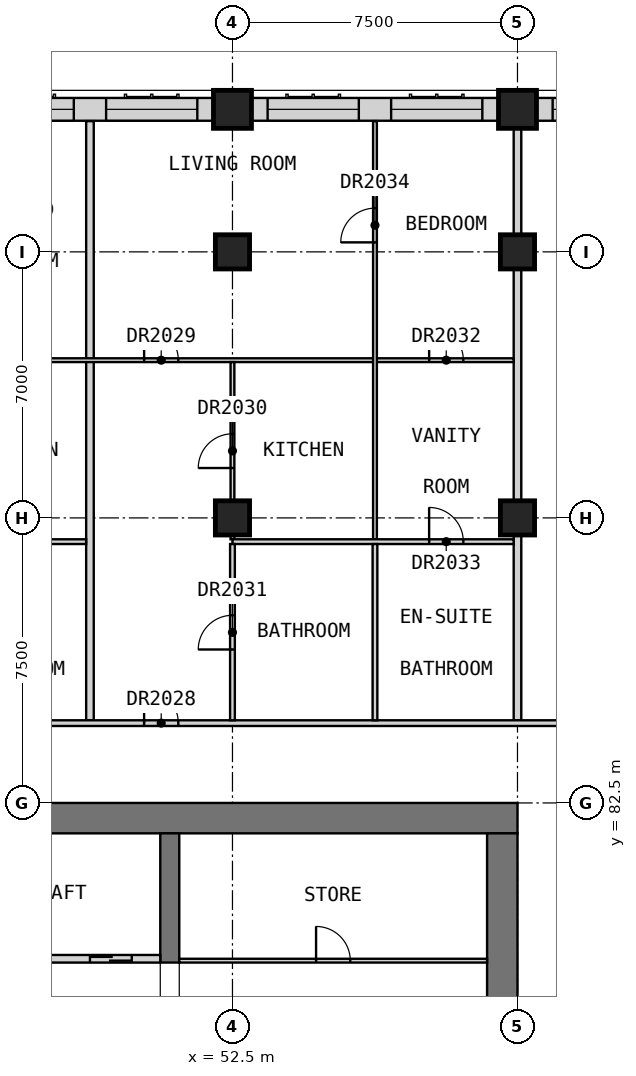
"""IFC4 building model, lengths in metres.
Left out: names, types, materials, properties, quantities, classifications, styles, units other than length and angle.
Written with IfcOpenShell. Run it as: python <this file> out.ifc"""

import sys

from ifc_helpers import new_model, si_unit, direction, frame, frame_2d, origin, origin_2d, place, context, subcontext, project, spatial, rectangle, extrude, element, fill, save


model = new_model("IFC4")
c1 = context("Model", 3, precision=1e-05, world=origin(), true_north=direction((0.0, 1.0)))
c2 = subcontext(c1, "Body", "Model", "MODEL_VIEW")
j1 = project(units=[si_unit("LENGTHUNIT", "METRE"), si_unit("PLANEANGLEUNIT", "RADIAN")], contexts=[c1])
p1 = place(None, origin())
s1 = spatial("IfcSite", under=j1, at=p1, CompositionType="ELEMENT")
p2 = place(p1, origin())
s2 = spatial("IfcBuilding", under=s1, at=p2, CompositionType="ELEMENT")
p3 = place(p2, frame((0.0, 0.0, 210.7)))
s3 = spatial("IfcBuildingStorey", under=s2, at=p3, CompositionType="ELEMENT", Elevation=210.7)
for number, where, z_axis, x_axis in (
    (1, (52.5, 100.75, 0.0), (0.0, 0.0, 1.0), (1.0, 0.0, 0.0)),
    (2, (60.0, 100.75, 0.0), (0.0, 0.0, 1.0), (1.0, 0.0, 0.0)),
):
    element("IfcColumn", number, at=place(p3, frame(where, z_axis=z_axis, x_axis=x_axis)), inside=s3, PredefinedType="COLUMN", context=c2, shape_type="SweptSolid", body=[
        extrude(rectangle(XDim=1.0, YDim=1.0, at=origin_2d()), origin(), (0.0, 0.0, 1.0), 3.5),
    ])
for number, where, z_axis, x_axis in (
    (3, (52.5, 90.0, 0.0), (0.0, 0.0, 1.0), (1.0, 0.0, 0.0)),
    (4, (52.5, 97.0, 0.0), (0.0, 0.0, 1.0), (1.0, 0.0, 0.0)),
    (5, (60.0, 90.0, 0.0), (0.0, 0.0, 1.0), (1.0, 0.0, 0.0)),
    (6, (60.0, 97.0, 0.0), (0.0, 0.0, 1.0), (1.0, 0.0, 0.0)),
):
    element("IfcColumn", number, at=place(p3, frame(where, z_axis=z_axis, x_axis=x_axis)), inside=s3, PredefinedType="COLUMN", context=c2, shape_type="SweptSolid", body=[
        extrude(rectangle(XDim=0.9, YDim=0.9, at=origin_2d()), origin(), (0.0, 0.0, 1.0), 3.5),
    ])
p4 = place(p3, frame((30.0, 82.1, 0.0), z_axis=(0.0, 0.0, 1.0), x_axis=(1.0, 0.0, 0.0)))
e7 = element("IfcWall", 7, at=p4, inside=s3, PredefinedType="SHEAR", context=c2, shape_type="SweptSolid", body=[
    extrude(rectangle(XDim=30.0, YDim=0.8, at=frame_2d((15.0, 0.0))), origin(), (0.0, 0.0, 1.0), 3.5),
])
p5 = place(p3, frame((59.6, 60.8, 0.0), z_axis=(0.0, 0.0, 1.0), x_axis=(0.0, 1.0, 0.0)))
e8 = element("IfcWall", 8, at=p5, inside=s3, PredefinedType="SHEAR", context=c2, shape_type="SweptSolid", body=[
    extrude(rectangle(XDim=20.9, YDim=0.8, at=frame_2d((10.45, 0.0))), origin(), (0.0, 0.0, 1.0), 3.5),
])
p6 = place(p5, frame((14.7, 0.0, 0.0)))
e9 = element("IfcOpeningElement", 9, at=p6, cuts=e8, PredefinedType="OPENING", context=c2, shape_type="SweptSolid", body=[
    extrude(rectangle(XDim=1.8, YDim=2.1, at=frame_2d((0.9, 1.05))), frame((0.0, 0.41, 0.0), z_axis=(0.0, -1.0, 0.0), x_axis=(1.0, 0.0, 0.0)), (0.0, 0.0, 1.0), 0.82),
])
p7 = place(p3, frame((50.85, 78.3, 0.0), z_axis=(0.0, 0.0, 1.0), x_axis=(0.0, 1.0, 0.0)))
e10 = element("IfcWall", 10, at=p7, inside=s3, PredefinedType="SHEAR", context=c2, shape_type="SweptSolid", body=[
    extrude(rectangle(XDim=3.4, YDim=0.5, at=frame_2d((1.7, 0.0))), origin(), (0.0, 0.0, 1.0), 3.5),
])
p8 = place(p3, frame((67.0, 100.75, 0.0), z_axis=(0.0, 0.0, 1.0), x_axis=(-1.0, 0.0, 0.0)))
e11 = element("IfcWall", 11, at=p8, inside=s3, PredefinedType="SOLIDWALL", context=c2, shape_type="SweptSolid", body=[
    extrude(rectangle(XDim=6.5, YDim=0.6, at=frame_2d((3.25, 0.0))), origin(), (0.0, 0.0, 1.0), 2.75),
])
p9 = place(p8, frame((3.675, 0.0, 0.8)))
e12 = element("IfcOpeningElement", 12, at=p9, cuts=e11, PredefinedType="OPENING", context=c2, shape_type="SweptSolid", body=[
    extrude(rectangle(XDim=2.4, YDim=1.8, at=frame_2d((1.2, 0.9))), frame((0.0, 0.31, 0.0), z_axis=(0.0, -1.0, 0.0), x_axis=(1.0, 0.0, 0.0)), (0.0, 0.0, 1.0), 0.62),
])
p10 = place(p8, frame((0.425, 0.0, 0.8)))
e13 = element("IfcOpeningElement", 13, at=p10, cuts=e11, PredefinedType="OPENING", context=c2, shape_type="SweptSolid", body=[
    extrude(rectangle(XDim=2.4, YDim=1.8, at=frame_2d((1.2, 0.9))), frame((0.0, 0.31, 0.0), z_axis=(0.0, -1.0, 0.0), x_axis=(1.0, 0.0, 0.0)), (0.0, 0.0, 1.0), 0.62),
])
p11 = place(p3, frame((59.5, 100.75, 0.0), z_axis=(0.0, 0.0, 1.0), x_axis=(-1.0, 0.0, 0.0)))
e14 = element("IfcWall", 14, at=p11, inside=s3, PredefinedType="SOLIDWALL", context=c2, shape_type="SweptSolid", body=[
    extrude(rectangle(XDim=6.5, YDim=0.6, at=frame_2d((3.25, 0.0))), origin(), (0.0, 0.0, 1.0), 2.75),
])
p12 = place(p11, frame((3.675, 0.0, 0.8)))
e15 = element("IfcOpeningElement", 15, at=p12, cuts=e14, PredefinedType="OPENING", context=c2, shape_type="SweptSolid", body=[
    extrude(rectangle(XDim=2.4, YDim=1.8, at=frame_2d((1.2, 0.9))), frame((0.0, 0.31, 0.0), z_axis=(0.0, -1.0, 0.0), x_axis=(1.0, 0.0, 0.0)), (0.0, 0.0, 1.0), 0.62),
])
p13 = place(p11, frame((0.425, 0.0, 0.8)))
e16 = element("IfcOpeningElement", 16, at=p13, cuts=e14, PredefinedType="OPENING", context=c2, shape_type="SweptSolid", body=[
    extrude(rectangle(XDim=2.4, YDim=1.8, at=frame_2d((1.2, 0.9))), frame((0.0, 0.31, 0.0), z_axis=(0.0, -1.0, 0.0), x_axis=(1.0, 0.0, 0.0)), (0.0, 0.0, 1.0), 0.62),
])
p14 = place(p3, frame((52.0, 100.75, 0.0), z_axis=(0.0, 0.0, 1.0), x_axis=(-1.0, 0.0, 0.0)))
e17 = element("IfcWall", 17, at=p14, inside=s3, PredefinedType="SOLIDWALL", context=c2, shape_type="SweptSolid", body=[
    extrude(rectangle(XDim=6.5, YDim=0.6, at=frame_2d((3.25, 0.0))), origin(), (0.0, 0.0, 1.0), 2.75),
])
p15 = place(p14, frame((3.675, 0.0, 0.8)))
e18 = element("IfcOpeningElement", 18, at=p15, cuts=e17, PredefinedType="OPENING", context=c2, shape_type="SweptSolid", body=[
    extrude(rectangle(XDim=2.4, YDim=1.8, at=frame_2d((1.2, 0.9))), frame((0.0, 0.31, 0.0), z_axis=(0.0, -1.0, 0.0), x_axis=(1.0, 0.0, 0.0)), (0.0, 0.0, 1.0), 0.62),
])
p16 = place(p14, frame((0.425, 0.0, 0.8)))
e19 = element("IfcOpeningElement", 19, at=p16, cuts=e17, PredefinedType="OPENING", context=c2, shape_type="SweptSolid", body=[
    extrude(rectangle(XDim=2.4, YDim=1.8, at=frame_2d((1.2, 0.9))), frame((0.0, 0.31, 0.0), z_axis=(0.0, -1.0, 0.0), x_axis=(1.0, 0.0, 0.0)), (0.0, 0.0, 1.0), 0.62),
])
p17 = place(p3, frame((35.0, 78.4, 0.0), z_axis=(0.0, 0.0, 1.0), x_axis=(1.0, 0.0, 0.0)))
e20 = element("IfcWall", 20, at=p17, inside=s3, PredefinedType="SOLIDWALL", context=c2, shape_type="SweptSolid", body=[
    extrude(rectangle(XDim=15.6, YDim=0.2, at=frame_2d((7.8, 0.0))), origin(), (0.0, 0.0, 1.0), 3.5),
])
p18 = place(p17, frame((0.75, 0.0, 0.0)))
e21 = element("IfcOpeningElement", 21, at=p18, cuts=e20, PredefinedType="OPENING", context=c2, shape_type="SweptSolid", body=[
    extrude(rectangle(XDim=1.1, YDim=2.1, at=frame_2d((0.55, 1.05))), frame((0.0, 0.11, 0.0), z_axis=(0.0, -1.0, 0.0), x_axis=(1.0, 0.0, 0.0)), (0.0, 0.0, 1.0), 0.22),
])
p19 = place(p17, frame((3.35, 0.0, 0.0)))
e22 = element("IfcOpeningElement", 22, at=p19, cuts=e20, PredefinedType="OPENING", context=c2, shape_type="SweptSolid", body=[
    extrude(rectangle(XDim=1.1, YDim=2.1, at=frame_2d((0.55, 1.05))), frame((0.0, 0.11, 0.0), z_axis=(0.0, -1.0, 0.0), x_axis=(1.0, 0.0, 0.0)), (0.0, 0.0, 1.0), 0.22),
])
p20 = place(p17, frame((11.15, 0.0, 0.0)))
e23 = element("IfcOpeningElement", 23, at=p20, cuts=e20, PredefinedType="OPENING", context=c2, shape_type="SweptSolid", body=[
    extrude(rectangle(XDim=1.1, YDim=2.1, at=frame_2d((0.55, 1.05))), frame((0.0, 0.11, 0.0), z_axis=(0.0, -1.0, 0.0), x_axis=(1.0, 0.0, 0.0)), (0.0, 0.0, 1.0), 0.22),
])
p21 = place(p17, frame((13.75, 0.0, 0.0)))
e24 = element("IfcOpeningElement", 24, at=p21, cuts=e20, PredefinedType="OPENING", context=c2, shape_type="SweptSolid", body=[
    extrude(rectangle(XDim=1.1, YDim=2.1, at=frame_2d((0.55, 1.05))), frame((0.0, 0.11, 0.0), z_axis=(0.0, -1.0, 0.0), x_axis=(1.0, 0.0, 0.0)), (0.0, 0.0, 1.0), 0.22),
])
p22 = place(p3, frame((51.1, 78.35, 0.0), z_axis=(0.0, 0.0, 1.0), x_axis=(1.0, 0.0, 0.0)))
e25 = element("IfcWall", 25, at=p22, inside=s3, PredefinedType="PARTITIONING", context=c2, shape_type="SweptSolid", body=[
    extrude(rectangle(XDim=8.1, YDim=0.1, at=frame_2d((4.05, 0.0))), origin(), (0.0, 0.0, 1.0), 3.09),
])
p23 = place(p22, frame((3.6, 0.0, 0.0)))
e26 = element("IfcOpeningElement", 26, at=p23, cuts=e25, PredefinedType="OPENING", context=c2, shape_type="SweptSolid", body=[
    extrude(rectangle(XDim=0.9, YDim=2.1, at=frame_2d((0.45, 1.05))), frame((0.0, 0.06, 0.0), z_axis=(0.0, -1.0, 0.0), x_axis=(1.0, 0.0, 0.0)), (0.0, 0.0, 1.0), 0.12),
])
p24 = place(p3, frame((48.75, 84.675, 0.0), z_axis=(0.0, 0.0, 1.0), x_axis=(0.0, 1.0, 0.0)))
e27 = element("IfcWall", 27, at=p24, inside=s3, PredefinedType="PARTITIONING", context=c2, shape_type="SweptSolid", body=[
    extrude(rectangle(XDim=15.765, YDim=0.2, at=frame_2d((7.882, 0.0))), origin(), (0.0, 0.0, 1.0), 3.1),
])
p25 = place(p3, frame((60.0, 84.675, 0.0), z_axis=(0.0, 0.0, 1.0), x_axis=(0.0, 1.0, 0.0)))
e28 = element("IfcWall", 28, at=p25, inside=s3, PredefinedType="PARTITIONING", context=c2, shape_type="SweptSolid", body=[
    extrude(rectangle(XDim=16.575, YDim=0.2, at=frame_2d((8.288, 0.0))), origin(), (0.0, 0.0, 1.0), 3.1),
])
p26 = place(p3, frame((33.75, 84.6, 0.0), z_axis=(0.0, 0.0, 1.0), x_axis=(1.0, 0.0, 0.0)))
e29 = element("IfcWall", 29, at=p26, inside=s3, PredefinedType="PARTITIONING", context=c2, shape_type="SweptSolid", body=[
    extrude(rectangle(XDim=28.35, YDim=0.15, at=frame_2d((14.175, 0.0))), origin(), (0.0, 0.0, 1.0), 3.1),
])
p27 = place(p26, frame((1.375, 0.0, 0.0)))
e30 = element("IfcOpeningElement", 30, at=p27, cuts=e29, PredefinedType="OPENING", context=c2, shape_type="SweptSolid", body=[
    extrude(rectangle(XDim=1.0, YDim=2.1, at=frame_2d((0.5, 1.05))), frame((0.0, 0.085, 0.0), z_axis=(0.0, -1.0, 0.0), x_axis=(1.0, 0.0, 0.0)), (0.0, 0.0, 1.0), 0.17),
])
p28 = place(p26, frame((8.925, 0.0, 0.0)))
e31 = element("IfcOpeningElement", 31, at=p28, cuts=e29, PredefinedType="OPENING", context=c2, shape_type="SweptSolid", body=[
    extrude(rectangle(XDim=0.9, YDim=2.1, at=frame_2d((0.45, 1.05))), frame((0.0, 0.085, 0.0), z_axis=(0.0, -1.0, 0.0), x_axis=(1.0, 0.0, 0.0)), (0.0, 0.0, 1.0), 0.17),
])
p29 = place(p26, frame((16.425, 0.0, 0.0)))
e32 = element("IfcOpeningElement", 32, at=p29, cuts=e29, PredefinedType="OPENING", context=c2, shape_type="SweptSolid", body=[
    extrude(rectangle(XDim=0.9, YDim=2.1, at=frame_2d((0.45, 1.05))), frame((0.0, 0.085, 0.0), z_axis=(0.0, -1.0, 0.0), x_axis=(1.0, 0.0, 0.0)), (0.0, 0.0, 1.0), 0.17),
])
p30 = place(p3, frame((37.6, 94.15, 0.0), z_axis=(0.0, 0.0, 1.0), x_axis=(1.0, 0.0, 0.0)))
e33 = element("IfcWall", 33, at=p30, inside=s3, PredefinedType="PARTITIONING", context=c2, shape_type="SweptSolid", body=[
    extrude(rectangle(XDim=22.3, YDim=0.1, at=frame_2d((11.15, 0.0))), origin(), (0.0, 0.0, 1.0), 3.1),
])
p31 = place(p30, frame((1.325, 0.0, 0.0)))
e34 = element("IfcOpeningElement", 34, at=p31, cuts=e33, PredefinedType="OPENING", context=c2, shape_type="SweptSolid", body=[
    extrude(rectangle(XDim=0.9, YDim=2.1, at=frame_2d((0.45, 1.05))), frame((0.0, 0.06, 0.0), z_axis=(0.0, -1.0, 0.0), x_axis=(1.0, 0.0, 0.0)), (0.0, 0.0, 1.0), 0.12),
])
p32 = place(p30, frame((5.075, 0.0, 0.0)))
e35 = element("IfcOpeningElement", 35, at=p32, cuts=e33, PredefinedType="OPENING", context=c2, shape_type="SweptSolid", body=[
    extrude(rectangle(XDim=0.9, YDim=2.1, at=frame_2d((0.45, 1.05))), frame((0.0, 0.06, 0.0), z_axis=(0.0, -1.0, 0.0), x_axis=(1.0, 0.0, 0.0)), (0.0, 0.0, 1.0), 0.12),
])
p33 = place(p30, frame((12.575, 0.0, 0.0)))
e36 = element("IfcOpeningElement", 36, at=p33, cuts=e33, PredefinedType="OPENING", context=c2, shape_type="SweptSolid", body=[
    extrude(rectangle(XDim=0.9, YDim=2.1, at=frame_2d((0.45, 1.05))), frame((0.0, 0.06, 0.0), z_axis=(0.0, -1.0, 0.0), x_axis=(1.0, 0.0, 0.0)), (0.0, 0.0, 1.0), 0.12),
])
p34 = place(p30, frame((20.075, 0.0, 0.0)))
e37 = element("IfcOpeningElement", 37, at=p34, cuts=e33, PredefinedType="OPENING", context=c2, shape_type="SweptSolid", body=[
    extrude(rectangle(XDim=0.9, YDim=2.1, at=frame_2d((0.45, 1.05))), frame((0.0, 0.06, 0.0), z_axis=(0.0, -1.0, 0.0), x_axis=(1.0, 0.0, 0.0)), (0.0, 0.0, 1.0), 0.12),
])
p35 = place(p3, frame((52.5, 89.438, 0.0), z_axis=(0.0, 0.0, 1.0), x_axis=(0.0, 1.0, 0.0)))
e38 = element("IfcWall", 38, at=p35, inside=s3, PredefinedType="PARTITIONING", context=c2, shape_type="SweptSolid", body=[
    extrude(rectangle(XDim=4.663, YDim=0.1, at=frame_2d((2.331, 0.0))), origin(), (0.0, 0.0, 1.0), 3.1),
])
p36 = place(p35, frame((1.875, 0.0, 0.0)))
e39 = element("IfcOpeningElement", 39, at=p36, cuts=e38, PredefinedType="OPENING", context=c2, shape_type="SweptSolid", body=[
    extrude(rectangle(XDim=0.9, YDim=2.1, at=frame_2d((0.45, 1.05))), frame((0.0, 0.06, 0.0), z_axis=(0.0, -1.0, 0.0), x_axis=(1.0, 0.0, 0.0)), (0.0, 0.0, 1.0), 0.12),
])
p37 = place(p3, frame((56.25, 89.438, 0.0), z_axis=(0.0, 0.0, 1.0), x_axis=(0.0, 1.0, 0.0)))
e40 = element("IfcWall", 40, at=p37, inside=s3, PredefinedType="PARTITIONING", context=c2, shape_type="SweptSolid", body=[
    extrude(rectangle(XDim=11.002, YDim=0.1, at=frame_2d((5.501, 0.0))), origin(), (0.0, 0.0, 1.0), 3.1),
])
p38 = place(p37, frame((7.812, 0.0, 0.0)))
e41 = element("IfcOpeningElement", 41, at=p38, cuts=e40, PredefinedType="OPENING", context=c2, shape_type="SweptSolid", body=[
    extrude(rectangle(XDim=0.9, YDim=2.1, at=frame_2d((0.45, 1.05))), frame((0.0, 0.06, 0.0), z_axis=(0.0, -1.0, 0.0), x_axis=(1.0, 0.0, 0.0)), (0.0, 0.0, 1.0), 0.12),
])
p39 = place(p3, frame((45.0, 89.375, 0.0), z_axis=(0.0, 0.0, 1.0), x_axis=(1.0, 0.0, 0.0)))
e42 = element("IfcWall", 42, at=p39, inside=s3, PredefinedType="PARTITIONING", context=c2, shape_type="SweptSolid", body=[
    extrude(rectangle(XDim=3.65, YDim=0.125, at=frame_2d((1.825, 0.0))), origin(), (0.0, 0.0, 1.0), 3.1),
])
p40 = place(p3, frame((52.5, 89.375, 0.0), z_axis=(0.0, 0.0, 1.0), x_axis=(1.0, 0.0, 0.0)))
e43 = element("IfcWall", 43, at=p40, inside=s3, PredefinedType="PARTITIONING", context=c2, shape_type="SweptSolid", body=[
    extrude(rectangle(XDim=7.4, YDim=0.125, at=frame_2d((3.7, 0.0))), origin(), (0.0, 0.0, 1.0), 3.1),
])
p41 = place(p40, frame((5.175, 0.0, 0.0)))
e44 = element("IfcOpeningElement", 44, at=p41, cuts=e43, PredefinedType="OPENING", context=c2, shape_type="SweptSolid", body=[
    extrude(rectangle(XDim=0.9, YDim=2.1, at=frame_2d((0.45, 1.05))), frame((0.0, 0.073, 0.0), z_axis=(0.0, -1.0, 0.0), x_axis=(1.0, 0.0, 0.0)), (0.0, 0.0, 1.0), 0.145),
])
p42 = place(p3, frame((52.5, 84.675, 0.0), z_axis=(0.0, 0.0, 1.0), x_axis=(0.0, 1.0, 0.0)))
e45 = element("IfcWall", 45, at=p42, inside=s3, PredefinedType="PARTITIONING", context=c2, shape_type="SweptSolid", body=[
    extrude(rectangle(XDim=4.637, YDim=0.125, at=frame_2d((2.319, 0.0))), origin(), (0.0, 0.0, 1.0), 3.1),
])
p43 = place(p42, frame((1.863, 0.0, 0.0)))
e46 = element("IfcOpeningElement", 46, at=p43, cuts=e45, PredefinedType="OPENING", context=c2, shape_type="SweptSolid", body=[
    extrude(rectangle(XDim=0.9, YDim=2.1, at=frame_2d((0.45, 1.05))), frame((0.0, 0.073, 0.0), z_axis=(0.0, -1.0, 0.0), x_axis=(1.0, 0.0, 0.0)), (0.0, 0.0, 1.0), 0.145),
])
p44 = place(p3, frame((56.25, 84.675, 0.0), z_axis=(0.0, 0.0, 1.0), x_axis=(0.0, 1.0, 0.0)))
e47 = element("IfcWall", 47, at=p44, inside=s3, PredefinedType="PARTITIONING", context=c2, shape_type="SweptSolid", body=[
    extrude(rectangle(XDim=4.637, YDim=0.125, at=frame_2d((2.319, 0.0))), origin(), (0.0, 0.0, 1.0), 3.1),
])
p45 = place(p9, origin())
e48 = element("IfcWindow", 48, at=p45, inside=s3, PartitioningType="SINGLE_PANEL", PredefinedType="WINDOW", context=c2, shape_type="SweptSolid", body=[
    extrude(rectangle(XDim=2.4, YDim=1.8, at=frame_2d((1.2, 0.9))), frame((0.0, -0.07, 0.0), z_axis=(0.0, -1.0, 0.0), x_axis=(1.0, 0.0, 0.0)), (0.0, 0.0, 1.0), 0.06),
])
fill(e12, e48)
p46 = place(p12, origin())
e49 = element("IfcWindow", 49, at=p46, inside=s3, PartitioningType="SINGLE_PANEL", PredefinedType="WINDOW", context=c2, shape_type="SweptSolid", body=[
    extrude(rectangle(XDim=2.4, YDim=1.8, at=frame_2d((1.2, 0.9))), frame((0.0, -0.07, 0.0), z_axis=(0.0, -1.0, 0.0), x_axis=(1.0, 0.0, 0.0)), (0.0, 0.0, 1.0), 0.06),
])
fill(e15, e49)
p47 = place(p13, origin())
e50 = element("IfcWindow", 50, at=p47, inside=s3, PartitioningType="SINGLE_PANEL", PredefinedType="WINDOW", context=c2, shape_type="SweptSolid", body=[
    extrude(rectangle(XDim=2.4, YDim=1.8, at=frame_2d((1.2, 0.9))), frame((0.0, -0.07, 0.0), z_axis=(0.0, -1.0, 0.0), x_axis=(1.0, 0.0, 0.0)), (0.0, 0.0, 1.0), 0.06),
])
fill(e16, e50)
p48 = place(p15, origin())
e51 = element("IfcWindow", 51, at=p48, inside=s3, PartitioningType="SINGLE_PANEL", PredefinedType="WINDOW", context=c2, shape_type="SweptSolid", body=[
    extrude(rectangle(XDim=2.4, YDim=1.8, at=frame_2d((1.2, 0.9))), frame((0.0, -0.07, 0.0), z_axis=(0.0, -1.0, 0.0), x_axis=(1.0, 0.0, 0.0)), (0.0, 0.0, 1.0), 0.06),
])
fill(e18, e51)
p49 = place(p16, origin())
e52 = element("IfcWindow", 52, at=p49, inside=s3, PartitioningType="SINGLE_PANEL", PredefinedType="WINDOW", context=c2, shape_type="SweptSolid", body=[
    extrude(rectangle(XDim=2.4, YDim=1.8, at=frame_2d((1.2, 0.9))), frame((0.0, -0.07, 0.0), z_axis=(0.0, -1.0, 0.0), x_axis=(1.0, 0.0, 0.0)), (0.0, 0.0, 1.0), 0.06),
])
fill(e19, e52)
p50 = place(p21, origin())
e53 = element("IfcDoor", 53, at=p50, inside=s3, OperationType="DOUBLE_DOOR_SLIDING", PredefinedType="DOOR", context=c2, shape_type="SweptSolid", body=[
    extrude(rectangle(XDim=1.1, YDim=2.1, at=frame_2d((0.55, 1.05))), frame((0.0, 0.025, 0.0), z_axis=(0.0, -1.0, 0.0), x_axis=(1.0, 0.0, 0.0)), (0.0, 0.0, 1.0), 0.05),
])
fill(e24, e53)
p51 = place(p23, origin())
e54 = element("IfcDoor", 54, at=p51, inside=s3, OperationType="SINGLE_SWING_RIGHT", PredefinedType="DOOR", context=c2, shape_type="SweptSolid", body=[
    extrude(rectangle(XDim=0.9, YDim=2.1, at=frame_2d((0.45, 1.05))), frame((0.0, 0.025, 0.0), z_axis=(0.0, -1.0, 0.0), x_axis=(1.0, 0.0, 0.0)), (0.0, 0.0, 1.0), 0.05),
])
fill(e26, e54)
p52 = place(p29, origin())
e55 = element("IfcDoor", 55, at=p52, inside=s3, OperationType="SINGLE_SWING_LEFT", PredefinedType="DOOR", context=c2, shape_type="SweptSolid", body=[
    extrude(rectangle(XDim=0.9, YDim=2.1, at=frame_2d((0.45, 1.05))), frame((0.0, 0.025, 0.0), z_axis=(0.0, -1.0, 0.0), x_axis=(1.0, 0.0, 0.0)), (0.0, 0.0, 1.0), 0.05),
])
fill(e32, e55)
p53 = place(p33, origin())
e56 = element("IfcDoor", 56, at=p53, inside=s3, OperationType="SINGLE_SWING_RIGHT", PredefinedType="DOOR", context=c2, shape_type="SweptSolid", body=[
    extrude(rectangle(XDim=0.9, YDim=2.1, at=frame_2d((0.45, 1.05))), frame((0.0, 0.025, 0.0), z_axis=(0.0, -1.0, 0.0), x_axis=(1.0, 0.0, 0.0)), (0.0, 0.0, 1.0), 0.05),
])
fill(e36, e56)
p54 = place(p36, origin())
e57 = element("IfcDoor", 57, at=p54, inside=s3, OperationType="SINGLE_SWING_LEFT", PredefinedType="DOOR", context=c2, shape_type="SweptSolid", body=[
    extrude(rectangle(XDim=0.9, YDim=2.1, at=frame_2d((0.45, 1.05))), frame((0.0, 0.025, 0.0), z_axis=(0.0, -1.0, 0.0), x_axis=(1.0, 0.0, 0.0)), (0.0, 0.0, 1.0), 0.05),
])
fill(e39, e57)
p55 = place(p43, origin())
e58 = element("IfcDoor", 58, at=p55, inside=s3, OperationType="SINGLE_SWING_RIGHT", PredefinedType="DOOR", context=c2, shape_type="SweptSolid", body=[
    extrude(rectangle(XDim=0.9, YDim=2.1, at=frame_2d((0.45, 1.05))), frame((0.0, 0.025, 0.0), z_axis=(0.0, -1.0, 0.0), x_axis=(1.0, 0.0, 0.0)), (0.0, 0.0, 1.0), 0.05),
])
fill(e46, e58)
p56 = place(p34, origin())
e59 = element("IfcDoor", 59, at=p56, inside=s3, OperationType="SINGLE_SWING_RIGHT", PredefinedType="DOOR", context=c2, shape_type="SweptSolid", body=[
    extrude(rectangle(XDim=0.9, YDim=2.1, at=frame_2d((0.45, 1.05))), frame((0.0, 0.025, 0.0), z_axis=(0.0, -1.0, 0.0), x_axis=(1.0, 0.0, 0.0)), (0.0, 0.0, 1.0), 0.05),
])
fill(e37, e59)
p57 = place(p41, origin())
e60 = element("IfcDoor", 60, at=p57, inside=s3, OperationType="SINGLE_SWING_RIGHT", PredefinedType="DOOR", context=c2, shape_type="SweptSolid", body=[
    extrude(rectangle(XDim=0.9, YDim=2.1, at=frame_2d((0.45, 1.05))), frame((0.0, 0.025, 0.0), z_axis=(0.0, -1.0, 0.0), x_axis=(1.0, 0.0, 0.0)), (0.0, 0.0, 1.0), 0.05),
])
fill(e44, e60)
p58 = place(p38, origin())
e61 = element("IfcDoor", 61, at=p58, inside=s3, OperationType="SINGLE_SWING_RIGHT", PredefinedType="DOOR", context=c2, shape_type="SweptSolid", body=[
    extrude(rectangle(XDim=0.9, YDim=2.1, at=frame_2d((0.45, 1.05))), frame((0.0, 0.025, 0.0), z_axis=(0.0, -1.0, 0.0), x_axis=(1.0, 0.0, 0.0)), (0.0, 0.0, 1.0), 0.05),
])
fill(e41, e61)
save(model, sys.argv[1])
